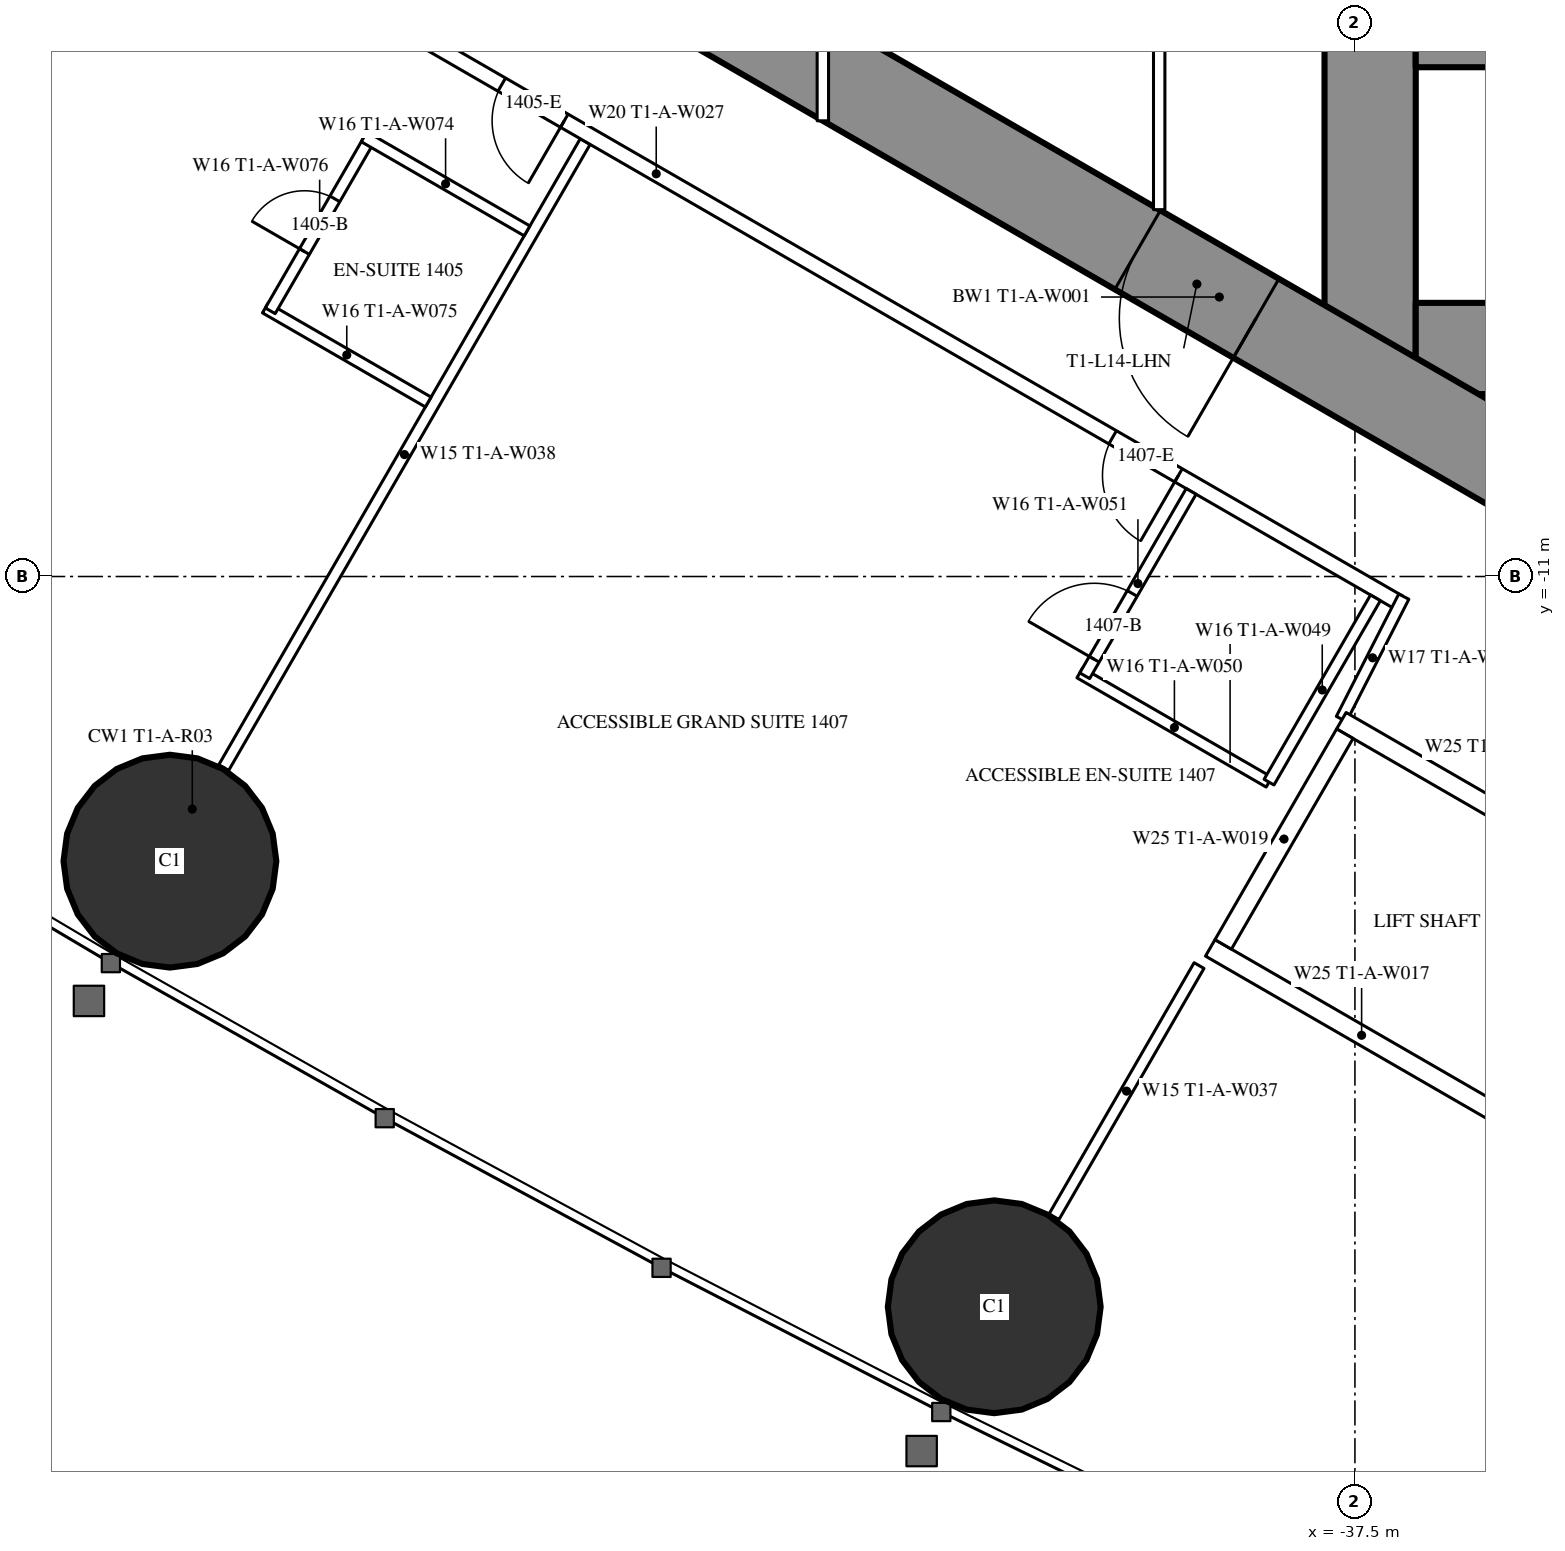
"""IFC4 building model, lengths in metres.
Left out: names, types, materials, properties, quantities, classifications, styles, units other than length and angle.
Written with IfcOpenShell. Run it as: python <this file> out.ifc"""

import sys

from ifc_helpers import new_model, si_unit, direction, frame, frame_2d, origin, origin_2d, place, context, subcontext, project, spatial, rectangle, hollow_circle, extrude, element, fill, save


model = new_model("IFC4")
c1 = context("Model", 3, precision=1e-05, world=origin(), true_north=direction((0.0, 1.0)))
c2 = subcontext(c1, "Body", "Model", "MODEL_VIEW")
j1 = project(units=[si_unit("LENGTHUNIT", "METRE"), si_unit("PLANEANGLEUNIT", "RADIAN")], contexts=[c1])
p1 = place(None, origin())
s1 = spatial("IfcSite", under=j1, at=p1, CompositionType="ELEMENT")
p2 = place(p1, origin())
s2 = spatial("IfcBuilding", under=s1, at=p2, CompositionType="ELEMENT")
p3 = place(p2, frame((0.0, 0.0, 56.5)))
s3 = spatial("IfcBuildingStorey", under=s2, at=p3, CompositionType="ELEMENT", Elevation=56.5)
for number, where, z_axis, x_axis in (
    (1, (-53.09, -14.745, 0.0), (0.0, 0.0, 1.0), (1.0, 0.0, 0.0)),
    (2, (-42.245, -20.607, 0.0), (0.0, 0.0, 1.0), (1.0, 0.0, 0.0)),
):
    element("IfcColumn", number, at=place(p3, frame(where, z_axis=z_axis, x_axis=x_axis)), inside=s3, PredefinedType="COLUMN", context=c2, shape_type="SweptSolid", body=[
        extrude(hollow_circle(Radius=1.4, WallThickness=0.12, at=origin_2d()), origin(), (0.0, 0.0, 1.0), 3.5),
    ])
p4 = place(p3, frame((-37.3, 8.6, 0.0), z_axis=(0.0, 0.0, 1.0), x_axis=(0.0, -1.0, 0.0)))
e3 = element("IfcWall", 3, at=p4, inside=s3, PredefinedType="SHEAR", context=c2, shape_type="SweptSolid", body=[
    extrude(rectangle(XDim=17.2, YDim=1.2, at=frame_2d((8.6, 0.0))), origin(), (0.0, 0.0, 1.0), 3.5),
])
p5 = place(p4, frame((7.7, 0.0, 0.0)))
e4 = element("IfcOpeningElement", 4, at=p5, cuts=e3, PredefinedType="OPENING", context=c2, shape_type="SweptSolid", body=[
    extrude(rectangle(XDim=1.8, YDim=2.2, at=frame_2d((0.9, 1.1))), frame((0.0, 0.61, 0.0), z_axis=(0.0, -1.0, 0.0), x_axis=(1.0, 0.0, 0.0)), (0.0, 0.0, 1.0), 1.22),
])
p6 = place(p3, frame((-28.3, -8.0, 0.0), z_axis=(0.0, 0.0, 1.0), x_axis=(-1.0, 0.0, 0.0)))
e5 = element("IfcWall", 5, at=p6, inside=s3, PredefinedType="SHEAR", context=c2, shape_type="SweptSolid", body=[
    extrude(rectangle(XDim=8.4, YDim=1.2, at=frame_2d((4.2, 0.0))), origin(), (0.0, 0.0, 1.0), 3.5),
])
p7 = place(p6, frame((0.25, 0.0, 0.0)))
e6 = element("IfcOpeningElement", 6, at=p7, cuts=e5, PredefinedType="OPENING", context=c2, shape_type="SweptSolid", body=[
    extrude(rectangle(XDim=1.0, YDim=2.2, at=frame_2d((0.5, 1.1))), frame((0.0, 0.61, 0.0), z_axis=(0.0, -1.0, 0.0), x_axis=(1.0, 0.0, 0.0)), (0.0, 0.0, 1.0), 1.22),
])
p8 = place(p3, frame((-28.3, -4.15, 0.0), z_axis=(0.0, 0.0, 1.0), x_axis=(-1.0, 0.0, 0.0)))
e7 = element("IfcWall", 7, at=p8, inside=s3, PredefinedType="SHEAR", context=c2, shape_type="SweptSolid", body=[
    extrude(rectangle(XDim=8.4, YDim=0.3, at=frame_2d((4.2, 0.0))), origin(), (0.0, 0.0, 1.0), 3.5),
])
p9 = place(p3, frame((-27.2, -14.3, 0.0), z_axis=(0.0, 0.0, 1.0), x_axis=(-0.866024021859, 0.500002393557, 0.0)))
e8 = element("IfcWall", 8, at=p9, inside=s3, PredefinedType="SHEAR", context=c2, shape_type="SweptSolid", body=[
    extrude(rectangle(XDim=27.907, YDim=1.2, at=frame_2d((13.954, 0.0))), origin(), (0.0, 0.0, 1.0), 3.5),
])
p10 = place(p9, frame((4.6, 0.0, 0.0)))
e9 = element("IfcOpeningElement", 9, at=p10, cuts=e8, PredefinedType="OPENING", context=c2, shape_type="SweptSolid", body=[
    extrude(rectangle(XDim=1.0, YDim=2.2, at=frame_2d((0.5, 1.1))), frame((0.0, 0.61, 0.0), z_axis=(0.0, -1.0, 0.0), x_axis=(1.0, 0.0, 0.0)), (0.0, 0.0, 1.0), 1.22),
])
p11 = place(p9, frame((13.395, 0.0, 0.0)))
e10 = element("IfcOpeningElement", 10, at=p11, cuts=e8, PredefinedType="OPENING", context=c2, shape_type="SweptSolid", body=[
    extrude(rectangle(XDim=1.8, YDim=2.2, at=frame_2d((0.9, 1.1))), frame((0.0, 0.61, 0.0), z_axis=(0.0, -1.0, 0.0), x_axis=(1.0, 0.0, 0.0)), (0.0, 0.0, 1.0), 1.22),
])
p12 = place(p3, frame((-47.627, -5.278, 0.0), z_axis=(0.0, 0.0, 1.0), x_axis=(-0.500009844318, -0.86601972009, 0.0)))
e11 = element("IfcWall", 11, at=p12, inside=s3, PredefinedType="PARTITIONING", context=c2, shape_type="SweptSolid", body=[
    extrude(rectangle(XDim=9.51, YDim=0.15, at=frame_2d((4.755, 0.0))), origin(), (0.0, 0.0, 1.0), 2.25),
])
p13 = place(p3, frame((-39.551, -16.118, 0.0), z_axis=(0.0, 0.0, 1.0), x_axis=(-0.499986503906, -0.866033195618, 0.0)))
e12 = element("IfcWall", 12, at=p13, inside=s3, PredefinedType="PARTITIONING", context=c2, shape_type="SweptSolid", body=[
    extrude(rectangle(XDim=3.815, YDim=0.15, at=frame_2d((1.907, 0.0))), origin(), (0.0, 0.0, 1.0), 3.25),
])
p14 = place(p3, frame((-36.92, -11.344, 0.0), z_axis=(0.0, 0.0, 1.0), x_axis=(-0.866028313256, 0.499994960614, 0.0)))
e13 = element("IfcWall", 13, at=p14, inside=s3, PredefinedType="PARTITIONING", context=c2, shape_type="SweptSolid", body=[
    extrude(rectangle(XDim=22.568, YDim=0.2, at=frame_2d((11.284, 0.0))), origin(), (0.0, 0.0, 1.0), 3.25),
])
p15 = place(p14, frame((12.68, 0.0, 0.0)))
e14 = element("IfcOpeningElement", 14, at=p15, cuts=e13, PredefinedType="OPENING", context=c2, shape_type="SweptSolid", body=[
    extrude(rectangle(XDim=0.95, YDim=2.2, at=frame_2d((0.475, 1.1))), frame((0.0, 0.11, 0.0), z_axis=(0.0, -1.0, 0.0), x_axis=(1.0, 0.0, 0.0)), (0.0, 0.0, 1.0), 0.22),
])
p16 = place(p14, frame((3.35, 0.0, 0.0)))
e15 = element("IfcOpeningElement", 15, at=p16, cuts=e13, PredefinedType="OPENING", context=c2, shape_type="SweptSolid", body=[
    extrude(rectangle(XDim=1.0, YDim=2.2, at=frame_2d((0.5, 1.1))), frame((0.0, 0.11, 0.0), z_axis=(0.0, -1.0, 0.0), x_axis=(1.0, 0.0, 0.0)), (0.0, 0.0, 1.0), 0.22),
])
p17 = place(p3, frame((-36.857, -11.265, 0.0), z_axis=(0.0, 0.0, 1.0), x_axis=(-0.454225294761, -0.890886851176, 0.0)))
e16 = element("IfcWall", 16, at=p17, inside=s3, PredefinedType="PARTITIONING", context=c2, shape_type="SweptSolid", body=[
    extrude(rectangle(XDim=1.807, YDim=0.15, at=frame_2d((0.904, 0.0))), origin(), (0.0, 0.0, 1.0), 3.25),
])
p18 = place(p3, frame((-49.692, -8.704, 0.0), z_axis=(0.0, 0.0, 1.0), x_axis=(-0.866073894602, 0.499916002032, 0.0)))
e17 = element("IfcWall", 17, at=p18, inside=s3, PredefinedType="PARTITIONING", context=c2, shape_type="SweptSolid", body=[
    extrude(rectangle(XDim=2.475, YDim=0.15, at=frame_2d((1.238, 0.0))), origin(), (0.0, 0.0, 1.0), 3.25),
])
p19 = place(p3, frame((-50.47, -5.253, 0.0), z_axis=(0.0, 0.0, 1.0), x_axis=(-0.500006934395, -0.866021400173, 0.0)))
e18 = element("IfcWall", 18, at=p19, inside=s3, PredefinedType="PARTITIONING", context=c2, shape_type="SweptSolid", body=[
    extrude(rectangle(XDim=2.6, YDim=0.15, at=frame_2d((1.3, 0.0))), origin(), (0.0, 0.0, 1.0), 3.25),
])
p20 = place(p19, frame((0.9, 0.0, 0.0)))
e19 = element("IfcOpeningElement", 19, at=p20, cuts=e18, PredefinedType="OPENING", context=c2, shape_type="SweptSolid", body=[
    extrude(rectangle(XDim=0.8, YDim=2.2, at=frame_2d((0.4, 1.1))), frame((0.0, 0.085, 0.0), z_axis=(0.0, -1.0, 0.0), x_axis=(1.0, 0.0, 0.0)), (0.0, 0.0, 1.0), 0.17),
])
p21 = place(p3, frame((-48.392, -6.453, 0.0), z_axis=(0.0, 0.0, 1.0), x_axis=(-0.86604923931, 0.499958713387, 0.0)))
e20 = element("IfcWall", 20, at=p21, inside=s3, PredefinedType="PARTITIONING", context=c2, shape_type="SweptSolid", body=[
    extrude(rectangle(XDim=2.475, YDim=0.15, at=frame_2d((1.237, 0.0))), origin(), (0.0, 0.0, 1.0), 3.25),
])
p22 = place(p3, frame((-38.63, -13.705, 0.0), z_axis=(0.0, 0.0, 1.0), x_axis=(-0.866018712932, 0.500011588718, 0.0)))
e21 = element("IfcWall", 21, at=p22, inside=s3, PredefinedType="PARTITIONING", context=c2, shape_type="SweptSolid", body=[
    extrude(rectangle(XDim=2.875, YDim=0.15, at=frame_2d((1.438, 0.0))), origin(), (0.0, 0.0, 1.0), 3.25),
])
p23 = place(p3, frame((-39.655, -9.88, 0.0), z_axis=(0.0, 0.0, 1.0), x_axis=(-0.500049511043, -0.865996816683, 0.0)))
e22 = element("IfcWall", 22, at=p23, inside=s3, PredefinedType="PARTITIONING", context=c2, shape_type="SweptSolid", body=[
    extrude(rectangle(XDim=2.8, YDim=0.15, at=frame_2d((1.4, 0.0))), origin(), (0.0, 0.0, 1.0), 3.25),
])
p24 = place(p23, frame((1.55, 0.0, 0.0)))
e23 = element("IfcOpeningElement", 23, at=p24, cuts=e22, PredefinedType="OPENING", context=c2, shape_type="SweptSolid", body=[
    extrude(rectangle(XDim=1.0, YDim=2.2, at=frame_2d((0.5, 1.1))), frame((0.0, 0.085, 0.0), z_axis=(0.0, -1.0, 0.0), x_axis=(1.0, 0.0, 0.0)), (0.0, 0.0, 1.0), 0.17),
])
p25 = place(p3, frame((-37.23, -11.281, 0.0), z_axis=(0.0, 0.0, 1.0), x_axis=(-0.500049511043, -0.865996816683, 0.0)))
e24 = element("IfcWall", 24, at=p25, inside=s3, PredefinedType="PARTITIONING", context=c2, shape_type="SweptSolid", body=[
    extrude(rectangle(XDim=2.8, YDim=0.15, at=frame_2d((1.4, 0.0))), origin(), (0.0, 0.0, 1.0), 3.25),
])
p26 = place(p3, frame((-40.075, 1.2, 0.0), z_axis=(0.0, 0.0, 1.0), x_axis=(0.0, -1.0, 0.0)))
e25 = element("IfcWall", 25, at=p26, inside=s3, PredefinedType="PARTITIONING", context=c2, shape_type="SweptSolid", body=[
    extrude(rectangle(XDim=7.374, YDim=0.15, at=frame_2d((3.687, 0.0))), origin(), (0.0, 0.0, 1.0), 3.25),
])
p27 = place(p26, frame((2.787, 0.0, 0.0)))
e26 = element("IfcOpeningElement", 26, at=p27, cuts=e25, PredefinedType="OPENING", context=c2, shape_type="SweptSolid", body=[
    extrude(rectangle(XDim=1.8, YDim=2.2, at=frame_2d((0.9, 1.1))), frame((0.0, 0.085, 0.0), z_axis=(0.0, -1.0, 0.0), x_axis=(1.0, 0.0, 0.0)), (0.0, 0.0, 1.0), 0.17),
])
p28 = place(p3, frame((-44.5, 5.005, 0.0), z_axis=(0.0, 0.0, 1.0), x_axis=(0.0, -1.0, 0.0)))
e27 = element("IfcWall", 27, at=p28, inside=s3, PredefinedType="PARTITIONING", context=c2, shape_type="SweptSolid", body=[
    extrude(rectangle(XDim=10.009, YDim=0.15, at=frame_2d((5.005, 0.0))), origin(), (0.0, 0.0, 1.0), 2.45),
])
p29 = place(p28, frame((4.505, 0.0, 0.0)))
e28 = element("IfcOpeningElement", 28, at=p29, cuts=e27, PredefinedType="OPENING", context=c2, shape_type="SweptSolid", body=[
    extrude(rectangle(XDim=1.0, YDim=2.2, at=frame_2d((0.5, 1.1))), frame((0.0, 0.085, 0.0), z_axis=(0.0, -1.0, 0.0), x_axis=(1.0, 0.0, 0.0)), (0.0, 0.0, 1.0), 0.17),
])
p30 = place(p3, frame((-33.696, -15.197, 0.0), z_axis=(0.0, 0.0, 1.0), x_axis=(-0.865976953817, 0.500083908417, 0.0)))
e29 = element("IfcWall", 29, at=p30, inside=s3, PredefinedType="PARTITIONING", context=c2, shape_type="SweptSolid", body=[
    extrude(rectangle(XDim=4.599, YDim=0.25, at=frame_2d((2.3, 0.0))), origin(), (0.0, 0.0, 1.0), 3.25),
])
p31 = place(p3, frame((-35.42, -18.186, 0.0), z_axis=(0.0, 0.0, 1.0), x_axis=(-0.865990227814, 0.50006092162, 0.0)))
e30 = element("IfcWall", 30, at=p31, inside=s3, PredefinedType="PARTITIONING", context=c2, shape_type="SweptSolid", body=[
    extrude(rectangle(XDim=4.6, YDim=0.25, at=frame_2d((2.3, 0.0))), origin(), (0.0, 0.0, 1.0), 3.25),
])
p32 = place(p3, frame((-37.633, -13.068, 0.0), z_axis=(0.0, 0.0, 1.0), x_axis=(-0.499872130319, -0.866099216793, 0.0)))
e31 = element("IfcWall", 31, at=p32, inside=s3, PredefinedType="PARTITIONING", context=c2, shape_type="SweptSolid", body=[
    extrude(rectangle(XDim=3.2, YDim=0.25, at=frame_2d((1.6, 0.0))), origin(), (0.0, 0.0, 1.0), 3.25),
])
p33 = place(p20, origin())
e32 = element("IfcDoor", 32, at=p33, inside=s3, OperationType="SINGLE_SWING_RIGHT", PredefinedType="DOOR", context=c2, shape_type="SweptSolid", body=[
    extrude(rectangle(XDim=0.8, YDim=2.2, at=frame_2d((0.4, 1.1))), frame((0.0, 0.025, 0.0), z_axis=(0.0, -1.0, 0.0), x_axis=(1.0, 0.0, 0.0)), (0.0, 0.0, 1.0), 0.05),
])
fill(e19, e32)
p34 = place(p15, origin())
e33 = element("IfcDoor", 33, at=p34, inside=s3, OperationType="SINGLE_SWING_LEFT", PredefinedType="DOOR", context=c2, shape_type="SweptSolid", body=[
    extrude(rectangle(XDim=0.95, YDim=2.2, at=frame_2d((0.475, 1.1))), frame((0.0, 0.025, 0.0), z_axis=(0.0, -1.0, 0.0), x_axis=(1.0, 0.0, 0.0)), (0.0, 0.0, 1.0), 0.05),
])
fill(e14, e33)
p35 = place(p24, origin())
e34 = element("IfcDoor", 34, at=p35, inside=s3, OperationType="SINGLE_SWING_RIGHT", PredefinedType="DOOR", context=c2, shape_type="SweptSolid", body=[
    extrude(rectangle(XDim=1.0, YDim=2.2, at=frame_2d((0.5, 1.1))), frame((0.0, 0.025, 0.0), z_axis=(0.0, -1.0, 0.0), x_axis=(1.0, 0.0, 0.0)), (0.0, 0.0, 1.0), 0.05),
])
fill(e23, e34)
p36 = place(p16, origin())
e35 = element("IfcDoor", 35, at=p36, inside=s3, OperationType="SINGLE_SWING_LEFT", PredefinedType="DOOR", context=c2, shape_type="SweptSolid", body=[
    extrude(rectangle(XDim=1.0, YDim=2.2, at=frame_2d((0.5, 1.1))), frame((0.0, 0.025, 0.0), z_axis=(0.0, -1.0, 0.0), x_axis=(1.0, 0.0, 0.0)), (0.0, 0.0, 1.0), 0.05),
])
fill(e15, e35)
p37 = place(p11, origin())
e36 = element("IfcDoor", 36, at=p37, inside=s3, OperationType="DOUBLE_DOOR_SINGLE_SWING", PredefinedType="DOOR", context=c2, shape_type="SweptSolid", body=[
    extrude(rectangle(XDim=1.8, YDim=2.2, at=frame_2d((0.9, 1.1))), frame((0.0, 0.025, 0.0), z_axis=(0.0, -1.0, 0.0), x_axis=(1.0, 0.0, 0.0)), (0.0, 0.0, 1.0), 0.05),
])
fill(e10, e36)
save(model, sys.argv[1])
